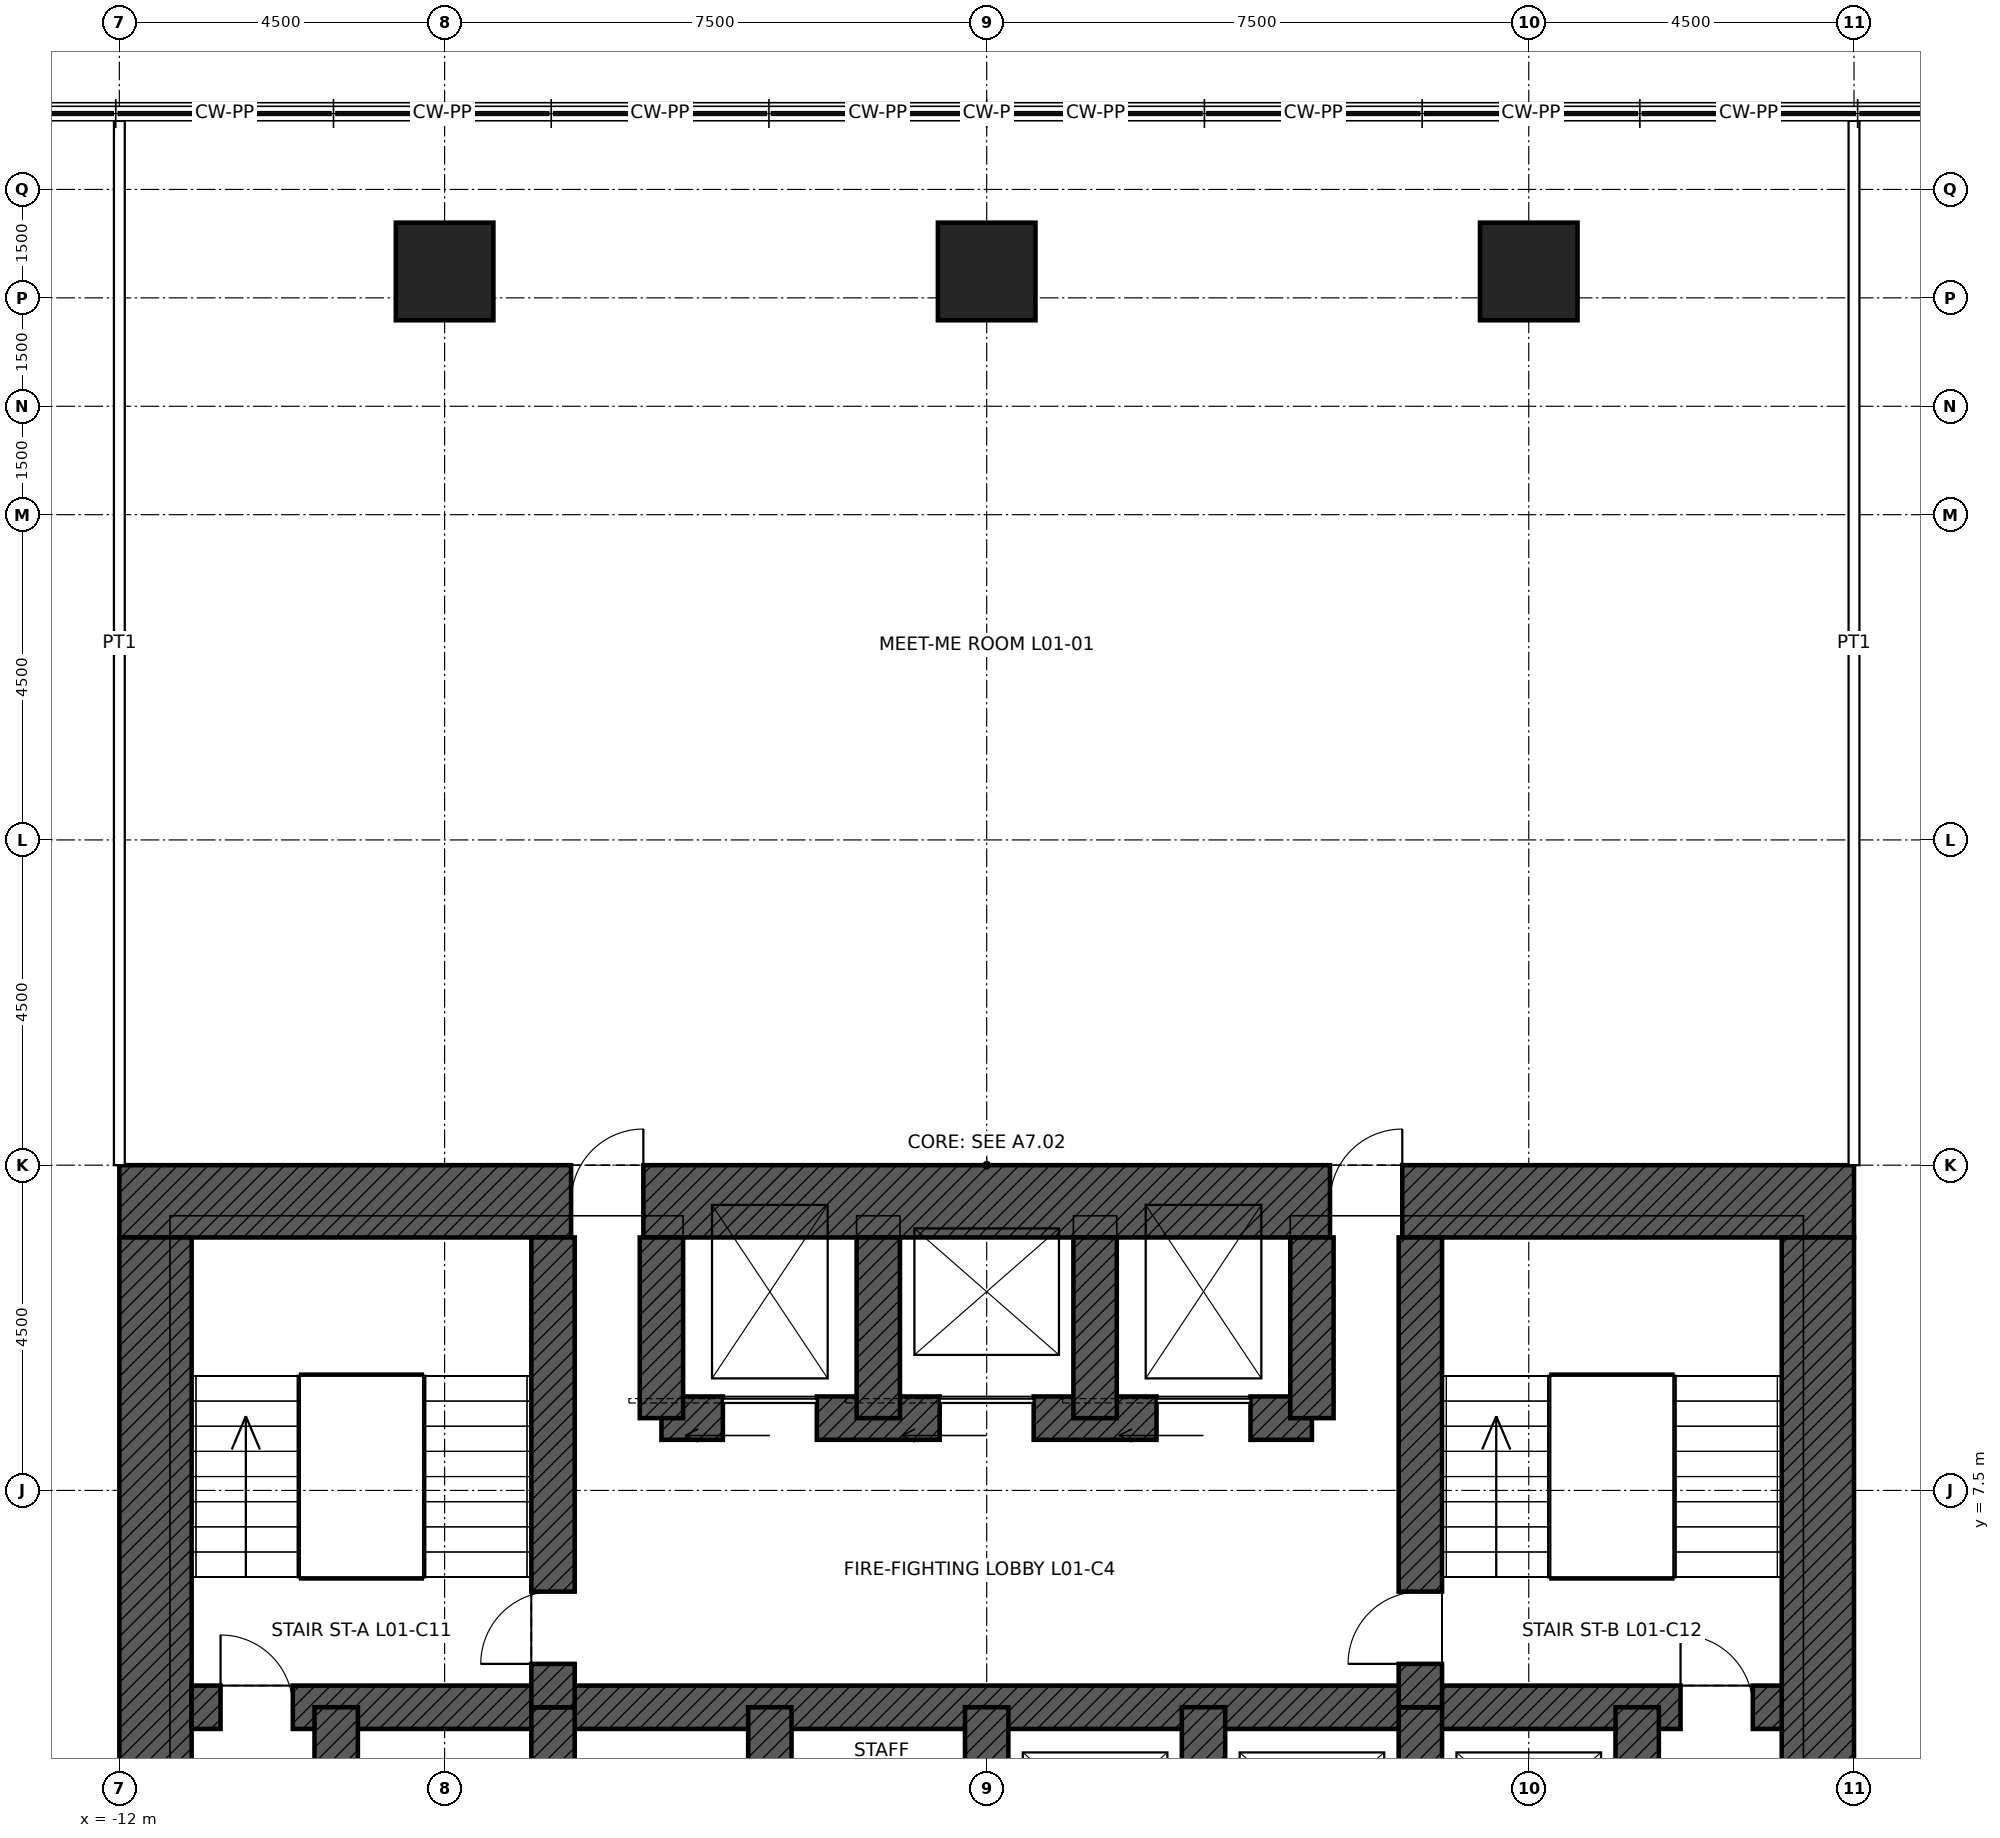
"""IFC4 building model, lengths in metres.
Left out: names, types, materials, properties, quantities, classifications, styles, units other than length and angle.
Written with IfcOpenShell. Run it as: python <this file> out.ifc"""

import sys

from ifc_helpers import new_model, si_unit, direction, frame, frame_2d, origin, origin_2d, place, context, subcontext, project, spatial, rectangle, hollow_rectangle, extrude, element, fill, save


model = new_model("IFC4")
c1 = context("Model", 3, precision=1e-05, world=origin(), true_north=direction((0.0, 1.0)))
c2 = subcontext(c1, "Body", "Model", "MODEL_VIEW")
j1 = project(units=[si_unit("LENGTHUNIT", "METRE"), si_unit("PLANEANGLEUNIT", "RADIAN")], contexts=[c1])
p1 = place(None, origin())
s1 = spatial("IfcSite", under=j1, at=p1, CompositionType="ELEMENT")
p2 = place(p1, origin())
s2 = spatial("IfcBuilding", under=s1, at=p2, CompositionType="ELEMENT")
p3 = place(p2, frame((0.0, 0.0, 7.2)))
s3 = spatial("IfcBuildingStorey", under=s2, at=p3, CompositionType="ELEMENT", Elevation=7.2)
for number, where, z_axis, x_axis in (
    (1, (-7.5, 24.365, 0.0), (0.0, 0.0, 1.0), (1.0, 0.0, 0.0)),
    (2, (0.0, 24.365, 0.0), (0.0, 0.0, 1.0), (1.0, 0.0, 0.0)),
    (3, (7.5, 24.365, 0.0), (0.0, 0.0, 1.0), (1.0, 0.0, 0.0)),
):
    element("IfcColumn", number, at=place(p3, frame(where, z_axis=z_axis, x_axis=x_axis)), inside=s3, PredefinedType="COLUMN", context=c2, shape_type="SweptSolid", body=[
        extrude(hollow_rectangle(XDim=1.35, YDim=1.35, WallThickness=0.1, at=origin_2d()), origin(), (0.0, 0.0, 1.0), 5.4),
    ])
p4 = place(p3, frame((-12.0, 11.5, 0.0), z_axis=(0.0, 0.0, 1.0), x_axis=(1.0, 0.0, 0.0)))
e4 = element("IfcWall", 4, at=p4, inside=s3, PredefinedType="SHEAR", context=c2, shape_type="SweptSolid", body=[
    extrude(rectangle(XDim=24.0, YDim=1.0, at=frame_2d((12.0, 0.0))), origin(), (0.0, 0.0, 1.0), 5.4),
])
p5 = place(p4, frame((6.25, 0.0, 0.0)))
e5 = element("IfcOpeningElement", 5, at=p5, cuts=e4, PredefinedType="OPENING", context=c2, shape_type="SweptSolid", body=[
    extrude(rectangle(XDim=1.0, YDim=2.4, at=frame_2d((0.5, 1.2))), frame((0.0, 0.51, 0.0), z_axis=(0.0, -1.0, 0.0), x_axis=(1.0, 0.0, 0.0)), (0.0, 0.0, 1.0), 1.02),
])
p6 = place(p4, frame((16.75, 0.0, 0.0)))
e6 = element("IfcOpeningElement", 6, at=p6, cuts=e4, PredefinedType="OPENING", context=c2, shape_type="SweptSolid", body=[
    extrude(rectangle(XDim=1.0, YDim=2.4, at=frame_2d((0.5, 1.2))), frame((0.0, 0.51, 0.0), z_axis=(0.0, -1.0, 0.0), x_axis=(1.0, 0.0, 0.0)), (0.0, 0.0, 1.0), 1.02),
])
p7 = place(p3, frame((11.5, 11.0, 0.0), z_axis=(0.0, 0.0, 1.0), x_axis=(0.0, -1.0, 0.0)))
e7 = element("IfcWall", 7, at=p7, inside=s3, PredefinedType="SHEAR", context=c2, shape_type="SweptSolid", body=[
    extrude(rectangle(XDim=22.0, YDim=1.0, at=frame_2d((11.0, 0.0))), origin(), (0.0, 0.0, 1.0), 5.4),
])
p8 = place(p7, frame((10.5, 0.0, 0.0)))
e8 = element("IfcOpeningElement", 8, at=p8, cuts=e7, PredefinedType="OPENING", context=c2, shape_type="SweptSolid", body=[
    extrude(rectangle(XDim=1.0, YDim=2.4, at=frame_2d((0.5, 1.2))), frame((0.0, 0.51, 0.0), z_axis=(0.0, -1.0, 0.0), x_axis=(1.0, 0.0, 0.0)), (0.0, 0.0, 1.0), 1.02),
])
p9 = place(p3, frame((-11.5, -11.0, 0.0), z_axis=(0.0, 0.0, 1.0), x_axis=(0.0, 1.0, 0.0)))
e9 = element("IfcWall", 9, at=p9, inside=s3, PredefinedType="SHEAR", context=c2, shape_type="SweptSolid", body=[
    extrude(rectangle(XDim=22.0, YDim=1.0, at=frame_2d((11.0, 0.0))), origin(), (0.0, 0.0, 1.0), 5.4),
])
p10 = place(p9, frame((10.5, 0.0, 0.0)))
e10 = element("IfcOpeningElement", 10, at=p10, cuts=e9, PredefinedType="OPENING", context=c2, shape_type="SweptSolid", body=[
    extrude(rectangle(XDim=1.0, YDim=2.4, at=frame_2d((0.5, 1.2))), frame((0.0, 0.51, 0.0), z_axis=(0.0, -1.0, 0.0), x_axis=(1.0, 0.0, 0.0)), (0.0, 0.0, 1.0), 1.02),
])
p11 = place(p3, frame((-11.0, 4.5, 0.0), z_axis=(0.0, 0.0, 1.0), x_axis=(1.0, 0.0, 0.0)))
e11 = element("IfcWall", 11, at=p11, inside=s3, PredefinedType="SHEAR", context=c2, shape_type="SweptSolid", body=[
    extrude(rectangle(XDim=22.0, YDim=0.6, at=frame_2d((11.0, 0.0))), origin(), (0.0, 0.0, 1.0), 5.4),
])
p12 = place(p11, frame((0.4, 0.0, 0.0)))
e12 = element("IfcOpeningElement", 12, at=p12, cuts=e11, PredefinedType="OPENING", context=c2, shape_type="SweptSolid", body=[
    extrude(rectangle(XDim=1.0, YDim=2.1, at=frame_2d((0.5, 1.05))), frame((0.0, 0.31, 0.0), z_axis=(0.0, -1.0, 0.0), x_axis=(1.0, 0.0, 0.0)), (0.0, 0.0, 1.0), 0.62),
])
p13 = place(p11, frame((20.6, 0.0, 0.0)))
e13 = element("IfcOpeningElement", 13, at=p13, cuts=e11, PredefinedType="OPENING", context=c2, shape_type="SweptSolid", body=[
    extrude(rectangle(XDim=1.0, YDim=2.1, at=frame_2d((0.5, 1.05))), frame((0.0, 0.31, 0.0), z_axis=(0.0, -1.0, 0.0), x_axis=(1.0, 0.0, 0.0)), (0.0, 0.0, 1.0), 0.62),
])
p14 = place(p3, frame((-4.5, 8.5, 0.0), z_axis=(0.0, 0.0, 1.0), x_axis=(1.0, 0.0, 0.0)))
e14 = element("IfcWall", 14, at=p14, inside=s3, PredefinedType="SHEAR", context=c2, shape_type="SweptSolid", body=[
    extrude(rectangle(XDim=9.0, YDim=0.6, at=frame_2d((4.5, 0.0))), origin(), (0.0, 0.0, 1.0), 5.4),
])
p15 = place(p14, frame((0.85, 0.0, 0.0)))
e15 = element("IfcOpeningElement", 15, at=p15, cuts=e14, PredefinedType="OPENING", context=c2, shape_type="SweptSolid", body=[
    extrude(rectangle(XDim=1.3, YDim=2.4, at=frame_2d((0.65, 1.2))), frame((0.0, 0.31, 0.0), z_axis=(0.0, -1.0, 0.0), x_axis=(1.0, 0.0, 0.0)), (0.0, 0.0, 1.0), 0.62),
])
p16 = place(p14, frame((6.85, 0.0, 0.0)))
e16 = element("IfcOpeningElement", 16, at=p16, cuts=e14, PredefinedType="OPENING", context=c2, shape_type="SweptSolid", body=[
    extrude(rectangle(XDim=1.3, YDim=2.4, at=frame_2d((0.65, 1.2))), frame((0.0, 0.31, 0.0), z_axis=(0.0, -1.0, 0.0), x_axis=(1.0, 0.0, 0.0)), (0.0, 0.0, 1.0), 0.62),
])
p17 = place(p14, frame((3.85, 0.0, 0.0)))
e17 = element("IfcOpeningElement", 17, at=p17, cuts=e14, PredefinedType="OPENING", context=c2, shape_type="SweptSolid", body=[
    extrude(rectangle(XDim=1.3, YDim=2.4, at=frame_2d((0.65, 1.2))), frame((0.0, 0.31, 0.0), z_axis=(0.0, -1.0, 0.0), x_axis=(1.0, 0.0, 0.0)), (0.0, 0.0, 1.0), 0.62),
])
for number, where, z_axis, x_axis in (
    (18, (-9.0, 1.5, 0.0), (0.0, 0.0, 1.0), (0.0, 1.0, 0.0)),
    (19, (9.0, 1.5, 0.0), (0.0, 0.0, 1.0), (0.0, 1.0, 0.0)),
    (20, (-6.0, 1.5, 0.0), (0.0, 0.0, 1.0), (0.0, 1.0, 0.0)),
    (21, (-3.0, 1.5, 0.0), (0.0, 0.0, 1.0), (0.0, 1.0, 0.0)),
    (22, (0.0, 1.5, 0.0), (0.0, 0.0, 1.0), (0.0, 1.0, 0.0)),
    (23, (3.0, 1.5, 0.0), (0.0, 0.0, 1.0), (0.0, 1.0, 0.0)),
    (24, (6.0, 1.5, 0.0), (0.0, 0.0, 1.0), (0.0, 1.0, 0.0)),
):
    element("IfcWall", number, at=place(p3, frame(where, z_axis=z_axis, x_axis=x_axis)), inside=s3, PredefinedType="SHEAR", context=c2, shape_type="SweptSolid", body=[
        extrude(rectangle(XDim=3.0, YDim=0.6, at=frame_2d((1.5, 0.0))), origin(), (0.0, 0.0, 1.0), 5.4),
    ])
p18 = place(p3, frame((-6.0, 4.5, 0.0), z_axis=(0.0, 0.0, 1.0), x_axis=(0.0, 1.0, 0.0)))
e25 = element("IfcWall", 25, at=p18, inside=s3, PredefinedType="SHEAR", context=c2, shape_type="SweptSolid", body=[
    extrude(rectangle(XDim=6.5, YDim=0.6, at=frame_2d((3.25, 0.0))), origin(), (0.0, 0.0, 1.0), 5.4),
])
p19 = place(p18, frame((0.6, 0.0, 0.0)))
e26 = element("IfcOpeningElement", 26, at=p19, cuts=e25, PredefinedType="OPENING", context=c2, shape_type="SweptSolid", body=[
    extrude(rectangle(XDim=1.0, YDim=2.1, at=frame_2d((0.5, 1.05))), frame((0.0, 0.31, 0.0), z_axis=(0.0, -1.0, 0.0), x_axis=(1.0, 0.0, 0.0)), (0.0, 0.0, 1.0), 0.62),
])
p20 = place(p3, frame((6.0, 4.5, 0.0), z_axis=(0.0, 0.0, 1.0), x_axis=(0.0, 1.0, 0.0)))
e27 = element("IfcWall", 27, at=p20, inside=s3, PredefinedType="SHEAR", context=c2, shape_type="SweptSolid", body=[
    extrude(rectangle(XDim=6.5, YDim=0.6, at=frame_2d((3.25, 0.0))), origin(), (0.0, 0.0, 1.0), 5.4),
])
p21 = place(p20, frame((0.6, 0.0, 0.0)))
e28 = element("IfcOpeningElement", 28, at=p21, cuts=e27, PredefinedType="OPENING", context=c2, shape_type="SweptSolid", body=[
    extrude(rectangle(XDim=1.0, YDim=2.1, at=frame_2d((0.5, 1.05))), frame((0.0, 0.31, 0.0), z_axis=(0.0, -1.0, 0.0), x_axis=(1.0, 0.0, 0.0)), (0.0, 0.0, 1.0), 0.62),
])
for number, where, z_axis, x_axis in (
    (29, (-4.5, 8.5, 0.0), (0.0, 0.0, 1.0), (0.0, 1.0, 0.0)),
    (30, (4.5, 8.5, 0.0), (0.0, 0.0, 1.0), (0.0, 1.0, 0.0)),
    (31, (-1.5, 8.5, 0.0), (0.0, 0.0, 1.0), (0.0, 1.0, 0.0)),
    (32, (1.5, 8.5, 0.0), (0.0, 0.0, 1.0), (0.0, 1.0, 0.0)),
):
    element("IfcWall", number, at=place(p3, frame(where, z_axis=z_axis, x_axis=x_axis)), inside=s3, PredefinedType="SHEAR", context=c2, shape_type="SweptSolid", body=[
        extrude(rectangle(XDim=2.5, YDim=0.6, at=frame_2d((1.25, 0.0))), origin(), (0.0, 0.0, 1.0), 5.4),
    ])
p22 = place(p3, frame((-12.0, 12.0, 0.0), z_axis=(0.0, 0.0, 1.0), x_axis=(0.0, 1.0, 0.0)))
e33 = element("IfcWall", 33, at=p22, inside=s3, PredefinedType="PARTITIONING", context=c2, shape_type="SweptSolid", body=[
    extrude(rectangle(XDim=14.45, YDim=0.15, at=frame_2d((7.225, 0.0))), origin(), (0.0, 0.0, 1.0), 4.109),
])
p23 = place(p3, frame((12.0, 12.0, 0.0), z_axis=(0.0, 0.0, 1.0), x_axis=(0.0, 1.0, 0.0)))
e34 = element("IfcWall", 34, at=p23, inside=s3, PredefinedType="PARTITIONING", context=c2, shape_type="SweptSolid", body=[
    extrude(rectangle(XDim=14.45, YDim=0.15, at=frame_2d((7.225, 0.0))), origin(), (0.0, 0.0, 1.0), 5.15),
])
p24 = place(p12, origin())
e35 = element("IfcDoor", 35, at=p24, inside=s3, OperationType="SINGLE_SWING_LEFT", PredefinedType="DOOR", context=c2, shape_type="SweptSolid", body=[
    extrude(rectangle(XDim=1.0, YDim=2.1, at=frame_2d((0.5, 1.05))), frame((0.0, 0.025, 0.0), z_axis=(0.0, -1.0, 0.0), x_axis=(1.0, 0.0, 0.0)), (0.0, 0.0, 1.0), 0.05),
])
fill(e12, e35)
p25 = place(p13, origin())
e36 = element("IfcDoor", 36, at=p25, inside=s3, OperationType="SINGLE_SWING_LEFT", PredefinedType="DOOR", context=c2, shape_type="SweptSolid", body=[
    extrude(rectangle(XDim=1.0, YDim=2.1, at=frame_2d((0.5, 1.05))), frame((0.0, 0.025, 0.0), z_axis=(0.0, -1.0, 0.0), x_axis=(1.0, 0.0, 0.0)), (0.0, 0.0, 1.0), 0.05),
])
fill(e13, e36)
p26 = place(p19, origin())
e37 = element("IfcDoor", 37, at=p26, inside=s3, OperationType="SINGLE_SWING_LEFT", PredefinedType="DOOR", context=c2, shape_type="SweptSolid", body=[
    extrude(rectangle(XDim=1.0, YDim=2.1, at=frame_2d((0.5, 1.05))), frame((0.0, 0.025, 0.0), z_axis=(0.0, -1.0, 0.0), x_axis=(1.0, 0.0, 0.0)), (0.0, 0.0, 1.0), 0.05),
])
fill(e26, e37)
p27 = place(p21, origin())
e38 = element("IfcDoor", 38, at=p27, inside=s3, OperationType="SINGLE_SWING_LEFT", PredefinedType="DOOR", context=c2, shape_type="SweptSolid", body=[
    extrude(rectangle(XDim=1.0, YDim=2.1, at=frame_2d((0.5, 1.05))), frame((0.0, 0.025, 0.0), z_axis=(0.0, -1.0, 0.0), x_axis=(1.0, 0.0, 0.0)), (0.0, 0.0, 1.0), 0.05),
])
fill(e28, e38)
p28 = place(p5, origin())
e39 = element("IfcDoor", 39, at=p28, inside=s3, OperationType="SINGLE_SWING_RIGHT", PredefinedType="DOOR", context=c2, shape_type="SweptSolid", body=[
    extrude(rectangle(XDim=1.0, YDim=2.4, at=frame_2d((0.5, 1.2))), frame((0.0, 0.485, 0.0), z_axis=(0.0, -1.0, 0.0), x_axis=(1.0, 0.0, 0.0)), (0.0, 0.0, 1.0), 0.05),
])
fill(e5, e39)
p29 = place(p6, origin())
e40 = element("IfcDoor", 40, at=p29, inside=s3, OperationType="SINGLE_SWING_RIGHT", PredefinedType="DOOR", context=c2, shape_type="SweptSolid", body=[
    extrude(rectangle(XDim=1.0, YDim=2.4, at=frame_2d((0.5, 1.2))), frame((0.0, 0.485, 0.0), z_axis=(0.0, -1.0, 0.0), x_axis=(1.0, 0.0, 0.0)), (0.0, 0.0, 1.0), 0.05),
])
fill(e6, e40)
p30 = place(p15, origin())
e41 = element("IfcDoor", 41, at=p30, inside=s3, OperationType="SLIDING_TO_LEFT", PredefinedType="DOOR", context=c2, shape_type="SweptSolid", body=[
    extrude(rectangle(XDim=1.3, YDim=2.4, at=frame_2d((0.65, 1.2))), frame((0.0, 0.025, 0.0), z_axis=(0.0, -1.0, 0.0), x_axis=(1.0, 0.0, 0.0)), (0.0, 0.0, 1.0), 0.05),
])
fill(e15, e41)
p31 = place(p16, origin())
e42 = element("IfcDoor", 42, at=p31, inside=s3, OperationType="SLIDING_TO_LEFT", PredefinedType="DOOR", context=c2, shape_type="SweptSolid", body=[
    extrude(rectangle(XDim=1.3, YDim=2.4, at=frame_2d((0.65, 1.2))), frame((0.0, 0.025, 0.0), z_axis=(0.0, -1.0, 0.0), x_axis=(1.0, 0.0, 0.0)), (0.0, 0.0, 1.0), 0.05),
])
fill(e16, e42)
p32 = place(p17, origin())
e43 = element("IfcDoor", 43, at=p32, inside=s3, OperationType="SLIDING_TO_LEFT", PredefinedType="DOOR", context=c2, shape_type="SweptSolid", body=[
    extrude(rectangle(XDim=1.3, YDim=2.4, at=frame_2d((0.65, 1.2))), frame((0.0, 0.025, 0.0), z_axis=(0.0, -1.0, 0.0), x_axis=(1.0, 0.0, 0.0)), (0.0, 0.0, 1.0), 0.05),
])
fill(e17, e43)
save(model, sys.argv[1])
